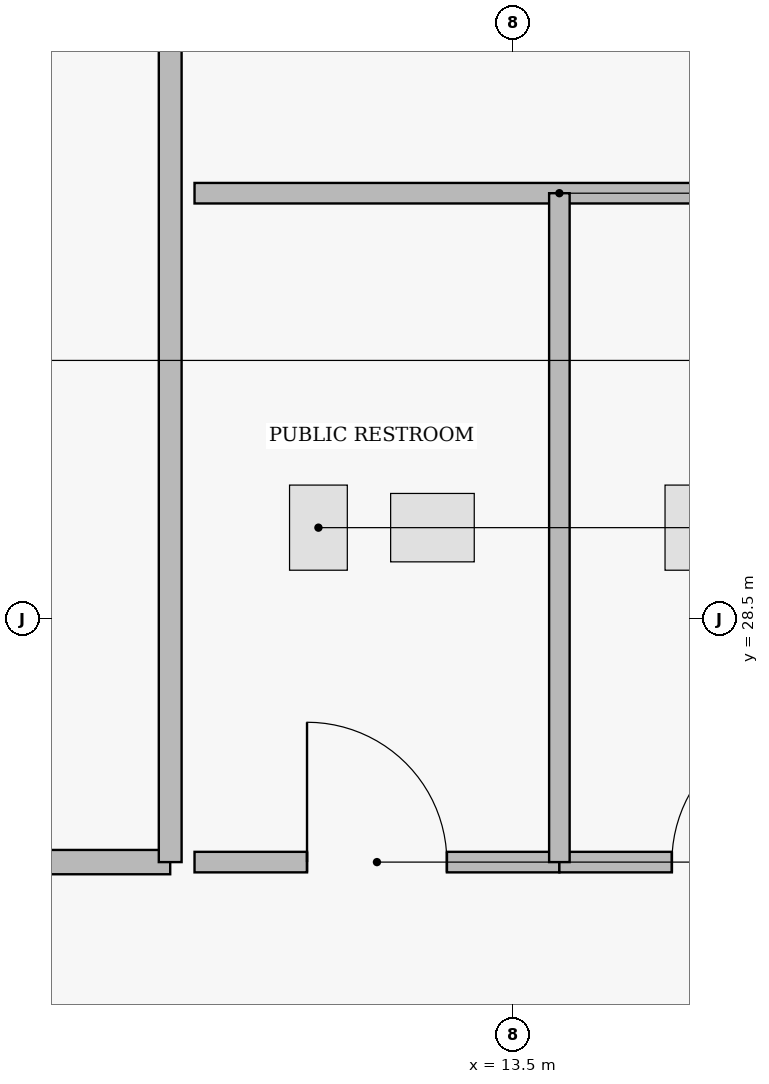
"""IFC4 building model, lengths in metres.
Left out: names, types, materials, properties, quantities, classifications, styles, units other than length and angle.
Written with IfcOpenShell. Run it as: python <this file> out.ifc"""

import sys

from ifc_helpers import new_model, si_unit, direction, frame, frame_2d, origin, place, context, subcontext, project, spatial, rectangle, extrude, element, fill, save


model = new_model("IFC4")
c1 = context("Model", 3, precision=1e-05, world=origin(), true_north=direction((0.0, 1.0)))
c2 = subcontext(c1, "Body", "Model", "MODEL_VIEW")
j1 = project(units=[si_unit("LENGTHUNIT", "METRE"), si_unit("PLANEANGLEUNIT", "RADIAN")], contexts=[c1])
p1 = place(None, origin())
s1 = spatial("IfcSite", under=j1, at=p1, CompositionType="ELEMENT")
p2 = place(p1, origin())
s2 = spatial("IfcBuilding", under=s1, at=p2, CompositionType="ELEMENT")
p3 = place(p2, frame((0.0, 0.0, 168.2)))
s3 = spatial("IfcBuildingStorey", under=s2, at=p3, CompositionType="ELEMENT", Elevation=168.2)
p4 = place(p3, frame((-22.04, 26.9, 0.0), z_axis=(0.0, 0.0, 1.0), x_axis=(1.0, 0.0, 0.0)))
e1 = element("IfcWall", 1, at=p4, inside=s3, PredefinedType="PARTITIONING", context=c2, shape_type="SweptSolid", body=[
    extrude(rectangle(XDim=33.28, YDim=0.16, at=frame_2d((16.64, 0.0))), origin(), (0.0, 0.0, 1.0), 4.38),
])
p5 = place(p4, frame((14.81, 0.0, 0.0)))
e2 = element("IfcOpeningElement", 2, at=p5, cuts=e1, PredefinedType="OPENING", context=c2, shape_type="SweptSolid", body=[
    extrude(rectangle(XDim=1.08, YDim=2.18, at=frame_2d((0.54, 1.09))), frame((0.0, 0.09, 0.0), z_axis=(0.0, -1.0, 0.0), x_axis=(1.0, 0.0, 0.0)), (0.0, 0.0, 1.0), 0.18),
])
p6 = place(p3, frame((11.4, 26.9, 0.0), z_axis=(0.0, 0.0, 1.0), x_axis=(1.0, 0.0, 0.0)))
e3 = element("IfcWall", 3, at=p6, inside=s3, PredefinedType="PLUMBINGWALL", context=c2, shape_type="SweptSolid", body=[
    extrude(rectangle(XDim=2.4, YDim=0.135, at=frame_2d((1.2, 0.0))), origin(), (0.0, 0.0, 1.0), 4.38),
])
p7 = place(p6, frame((0.74, 0.0, 0.0)))
e4 = element("IfcOpeningElement", 4, at=p7, cuts=e3, PredefinedType="OPENING", context=c2, shape_type="SweptSolid", body=[
    extrude(rectangle(XDim=0.92, YDim=2.12, at=frame_2d((0.46, 1.06))), frame((0.0, 0.077, 0.0), z_axis=(0.0, -1.0, 0.0), x_axis=(1.0, 0.0, 0.0)), (0.0, 0.0, 1.0), 0.155),
])
p8 = place(p3, frame((13.8, 26.9, 0.0), z_axis=(0.0, 0.0, 1.0), x_axis=(1.0, 0.0, 0.0)))
e5 = element("IfcWall", 5, at=p8, inside=s3, PredefinedType="PLUMBINGWALL", context=c2, shape_type="SweptSolid", body=[
    extrude(rectangle(XDim=2.4, YDim=0.135, at=frame_2d((1.2, 0.0))), origin(), (0.0, 0.0, 1.0), 4.38),
])
p9 = place(p8, frame((0.74, 0.0, 0.0)))
e6 = element("IfcOpeningElement", 6, at=p9, cuts=e5, PredefinedType="OPENING", context=c2, shape_type="SweptSolid", body=[
    extrude(rectangle(XDim=0.92, YDim=2.12, at=frame_2d((0.46, 1.06))), frame((0.0, 0.077, 0.0), z_axis=(0.0, -1.0, 0.0), x_axis=(1.0, 0.0, 0.0)), (0.0, 0.0, 1.0), 0.155),
])
p10 = place(p3, frame((11.24, 26.9, 0.0), z_axis=(0.0, 0.0, 1.0), x_axis=(0.0, 1.0, 0.0)))
e7 = element("IfcWall", 7, at=p10, inside=s3, PredefinedType="PARTITIONING", context=c2, shape_type="SweptSolid", body=[
    extrude(rectangle(XDim=6.64, YDim=0.15, at=frame_2d((3.32, 0.0))), origin(), (0.0, 0.0, 1.0), 4.38),
])
p11 = place(p3, frame((11.4, 31.3, 0.0), z_axis=(0.0, 0.0, 1.0), x_axis=(1.0, 0.0, 0.0)))
e8 = element("IfcWall", 8, at=p11, inside=s3, PredefinedType="PLUMBINGWALL", context=c2, shape_type="SweptSolid", body=[
    extrude(rectangle(XDim=4.8, YDim=0.135, at=frame_2d((2.4, 0.0))), origin(), (0.0, 0.0, 1.0), 4.38),
])
p12 = place(p3, frame((13.8, 26.9, 0.0), z_axis=(0.0, 0.0, 1.0), x_axis=(0.0, 1.0, 0.0)))
e9 = element("IfcWall", 9, at=p12, inside=s3, PredefinedType="PLUMBINGWALL", context=c2, shape_type="SweptSolid", body=[
    extrude(rectangle(XDim=4.4, YDim=0.135, at=frame_2d((2.2, 0.0))), origin(), (0.0, 0.0, 1.0), 3.369),
])
p13 = place(p7, origin())
e10 = element("IfcDoor", 10, at=p13, inside=s3, OperationType="SINGLE_SWING_LEFT", PredefinedType="DOOR", context=c2, shape_type="SweptSolid", body=[
    extrude(rectangle(XDim=0.92, YDim=2.12, at=frame_2d((0.46, 1.06))), frame((0.0, 0.025, 0.0), z_axis=(0.0, -1.0, 0.0), x_axis=(1.0, 0.0, 0.0)), (0.0, 0.0, 1.0), 0.05),
])
fill(e4, e10)
p14 = place(p9, origin())
e11 = element("IfcDoor", 11, at=p14, inside=s3, OperationType="SINGLE_SWING_RIGHT", PredefinedType="DOOR", context=c2, shape_type="SweptSolid", body=[
    extrude(rectangle(XDim=0.92, YDim=2.12, at=frame_2d((0.46, 1.06))), frame((0.0, 0.025, 0.0), z_axis=(0.0, -1.0, 0.0), x_axis=(1.0, 0.0, 0.0)), (0.0, 0.0, 1.0), 0.05),
])
fill(e6, e11)
save(model, sys.argv[1])
